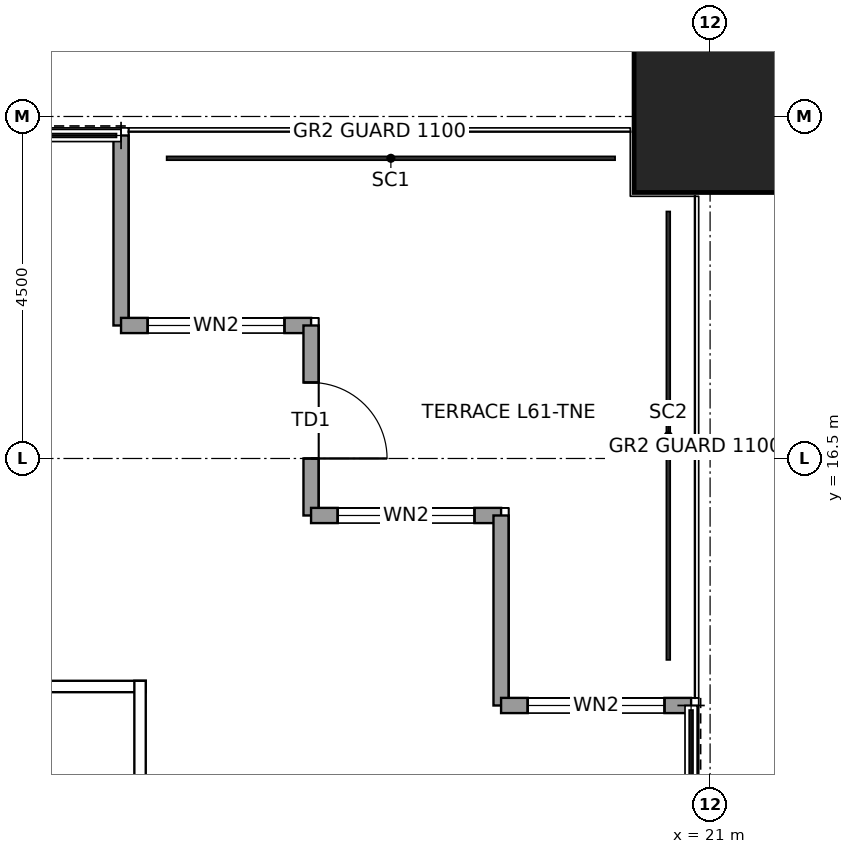
"""IFC4 building model, lengths in metres.
Left out: names, types, materials, properties, quantities, classifications, styles, units other than length and angle.
Written with IfcOpenShell. Run it as: python <this file> out.ifc"""

import sys

from ifc_helpers import new_model, si_unit, direction, frame, frame_2d, origin, origin_2d, place, context, subcontext, project, spatial, rectangle, hollow_rectangle, extrude, element, fill, save


model = new_model("IFC4")
c1 = context("Model", 3, precision=1e-05, world=origin(), true_north=direction((0.0, 1.0)))
c2 = subcontext(c1, "Body", "Model", "MODEL_VIEW")
j1 = project(units=[si_unit("LENGTHUNIT", "METRE"), si_unit("PLANEANGLEUNIT", "RADIAN")], contexts=[c1])
p1 = place(None, origin())
s1 = spatial("IfcSite", under=j1, at=p1, CompositionType="ELEMENT")
p2 = place(p1, origin())
s2 = spatial("IfcBuilding", under=s1, at=p2, CompositionType="ELEMENT")
p3 = place(p2, frame((0.0, 0.0, 279.9)))
s3 = spatial("IfcBuildingStorey", under=s2, at=p3, CompositionType="ELEMENT", Elevation=279.9)
p4 = place(p3, frame((21.0, 21.0, 0.0), z_axis=(0.0, 0.0, 1.0), x_axis=(1.0, 0.0, 0.0)))
e1 = element("IfcColumn", 1, at=p4, inside=s3, PredefinedType="COLUMN", context=c2, shape_type="SweptSolid", body=[
    extrude(hollow_rectangle(XDim=2.0, YDim=2.0, WallThickness=0.095, at=origin_2d()), origin(), (0.0, 0.0, 1.0), 4.0),
])
p5 = place(p3, frame((13.25, 20.75, 0.0), z_axis=(0.0, 0.0, 1.0), x_axis=(0.0, -1.0, 0.0)))
e2 = element("IfcWall", 2, at=p5, inside=s3, PredefinedType="SOLIDWALL", context=c2, shape_type="SweptSolid", body=[
    extrude(rectangle(XDim=2.5, YDim=0.2, at=frame_2d((1.25, 0.0))), origin(), (0.0, 0.0, 1.0), 3.85),
])
p6 = place(p3, frame((13.25, 18.25, 0.0), z_axis=(0.0, 0.0, 1.0), x_axis=(1.0, 0.0, 0.0)))
e3 = element("IfcWall", 3, at=p6, inside=s3, PredefinedType="SOLIDWALL", context=c2, shape_type="SweptSolid", body=[
    extrude(rectangle(XDim=2.5, YDim=0.2, at=frame_2d((1.25, 0.0))), origin(), (0.0, 0.0, 1.0), 3.85),
])
p7 = place(p6, frame((0.35, 0.0, 0.3)))
e4 = element("IfcOpeningElement", 4, at=p7, cuts=e3, PredefinedType="OPENING", context=c2, shape_type="SweptSolid", body=[
    extrude(rectangle(XDim=1.8, YDim=2.4, at=frame_2d((0.9, 1.2))), frame((0.0, 0.11, 0.0), z_axis=(0.0, -1.0, 0.0), x_axis=(1.0, 0.0, 0.0)), (0.0, 0.0, 1.0), 0.22),
])
p8 = place(p3, frame((15.75, 18.25, 0.0), z_axis=(0.0, 0.0, 1.0), x_axis=(0.0, -1.0, 0.0)))
e5 = element("IfcWall", 5, at=p8, inside=s3, PredefinedType="SOLIDWALL", context=c2, shape_type="SweptSolid", body=[
    extrude(rectangle(XDim=2.5, YDim=0.2, at=frame_2d((1.25, 0.0))), origin(), (0.0, 0.0, 1.0), 3.317),
])
p9 = place(p8, frame((0.75, 0.0, 0.0)))
e6 = element("IfcOpeningElement", 6, at=p9, cuts=e5, PredefinedType="OPENING", context=c2, shape_type="SweptSolid", body=[
    extrude(rectangle(XDim=1.0, YDim=2.4, at=frame_2d((0.5, 1.2))), frame((0.0, 0.11, 0.0), z_axis=(0.0, -1.0, 0.0), x_axis=(1.0, 0.0, 0.0)), (0.0, 0.0, 1.0), 0.22),
])
p10 = place(p3, frame((15.75, 15.75, 0.0), z_axis=(0.0, 0.0, 1.0), x_axis=(1.0, 0.0, 0.0)))
e7 = element("IfcWall", 7, at=p10, inside=s3, PredefinedType="SOLIDWALL", context=c2, shape_type="SweptSolid", body=[
    extrude(rectangle(XDim=2.5, YDim=0.2, at=frame_2d((1.25, 0.0))), origin(), (0.0, 0.0, 1.0), 3.85),
])
p11 = place(p10, frame((0.35, 0.0, 0.3)))
e8 = element("IfcOpeningElement", 8, at=p11, cuts=e7, PredefinedType="OPENING", context=c2, shape_type="SweptSolid", body=[
    extrude(rectangle(XDim=1.8, YDim=2.4, at=frame_2d((0.9, 1.2))), frame((0.0, 0.11, 0.0), z_axis=(0.0, -1.0, 0.0), x_axis=(1.0, 0.0, 0.0)), (0.0, 0.0, 1.0), 0.22),
])
p12 = place(p3, frame((18.25, 15.75, 0.0), z_axis=(0.0, 0.0, 1.0), x_axis=(0.0, -1.0, 0.0)))
e9 = element("IfcWall", 9, at=p12, inside=s3, PredefinedType="SOLIDWALL", context=c2, shape_type="SweptSolid", body=[
    extrude(rectangle(XDim=2.5, YDim=0.2, at=frame_2d((1.25, 0.0))), origin(), (0.0, 0.0, 1.0), 3.85),
])
p13 = place(p3, frame((18.25, 13.25, 0.0), z_axis=(0.0, 0.0, 1.0), x_axis=(1.0, 0.0, 0.0)))
e10 = element("IfcWall", 10, at=p13, inside=s3, PredefinedType="SOLIDWALL", context=c2, shape_type="SweptSolid", body=[
    extrude(rectangle(XDim=2.5, YDim=0.2, at=frame_2d((1.25, 0.0))), origin(), (0.0, 0.0, 1.0), 3.85),
])
p14 = place(p13, frame((0.35, 0.0, 0.3)))
e11 = element("IfcOpeningElement", 11, at=p14, cuts=e10, PredefinedType="OPENING", context=c2, shape_type="SweptSolid", body=[
    extrude(rectangle(XDim=1.8, YDim=2.4, at=frame_2d((0.9, 1.2))), frame((0.0, 0.11, 0.0), z_axis=(0.0, -1.0, 0.0), x_axis=(1.0, 0.0, 0.0)), (0.0, 0.0, 1.0), 0.22),
])
p15 = place(p3, frame((7.425, 13.5, 0.0), z_axis=(0.0, 0.0, 1.0), x_axis=(1.0, 0.0, 0.0)))
e12 = element("IfcWall", 12, at=p15, inside=s3, PredefinedType="PARTITIONING", context=c2, shape_type="SweptSolid", body=[
    extrude(rectangle(XDim=6.15, YDim=0.15, at=frame_2d((3.075, 0.0))), origin(), (0.0, 0.0, 1.0), 3.85),
])
p16 = place(p3, frame((13.5, -13.575, 0.0), z_axis=(0.0, 0.0, 1.0), x_axis=(0.0, 1.0, 0.0)))
e13 = element("IfcWall", 13, at=p16, inside=s3, PredefinedType="PARTITIONING", context=c2, shape_type="SweptSolid", body=[
    extrude(rectangle(XDim=27.15, YDim=0.15, at=frame_2d((13.575, 0.0))), origin(), (0.0, 0.0, 1.0), 3.85),
])
p17 = place(p7, origin())
e14 = element("IfcWindow", 14, at=p17, inside=s3, PartitioningType="SINGLE_PANEL", PredefinedType="WINDOW", context=c2, shape_type="SweptSolid", body=[
    extrude(rectangle(XDim=1.8, YDim=2.4, at=frame_2d((0.9, 1.2))), frame((0.0, 0.03, 0.0), z_axis=(0.0, -1.0, 0.0), x_axis=(1.0, 0.0, 0.0)), (0.0, 0.0, 1.0), 0.06),
])
fill(e4, e14)
p18 = place(p9, origin())
e15 = element("IfcDoor", 15, at=p18, inside=s3, OperationType="SINGLE_SWING_RIGHT", PredefinedType="DOOR", context=c2, shape_type="SweptSolid", body=[
    extrude(rectangle(XDim=1.0, YDim=2.4, at=frame_2d((0.5, 1.2))), frame((0.0, 0.025, 0.0), z_axis=(0.0, -1.0, 0.0), x_axis=(1.0, 0.0, 0.0)), (0.0, 0.0, 1.0), 0.05),
])
fill(e6, e15)
p19 = place(p11, origin())
e16 = element("IfcWindow", 16, at=p19, inside=s3, PartitioningType="SINGLE_PANEL", PredefinedType="WINDOW", context=c2, shape_type="SweptSolid", body=[
    extrude(rectangle(XDim=1.8, YDim=2.4, at=frame_2d((0.9, 1.2))), frame((0.0, 0.03, 0.0), z_axis=(0.0, -1.0, 0.0), x_axis=(1.0, 0.0, 0.0)), (0.0, 0.0, 1.0), 0.06),
])
fill(e8, e16)
p20 = place(p14, origin())
e17 = element("IfcWindow", 17, at=p20, inside=s3, PartitioningType="SINGLE_PANEL", PredefinedType="WINDOW", context=c2, shape_type="SweptSolid", body=[
    extrude(rectangle(XDim=1.8, YDim=2.4, at=frame_2d((0.9, 1.2))), frame((0.0, 0.03, 0.0), z_axis=(0.0, -1.0, 0.0), x_axis=(1.0, 0.0, 0.0)), (0.0, 0.0, 1.0), 0.06),
])
fill(e11, e17)
save(model, sys.argv[1])
